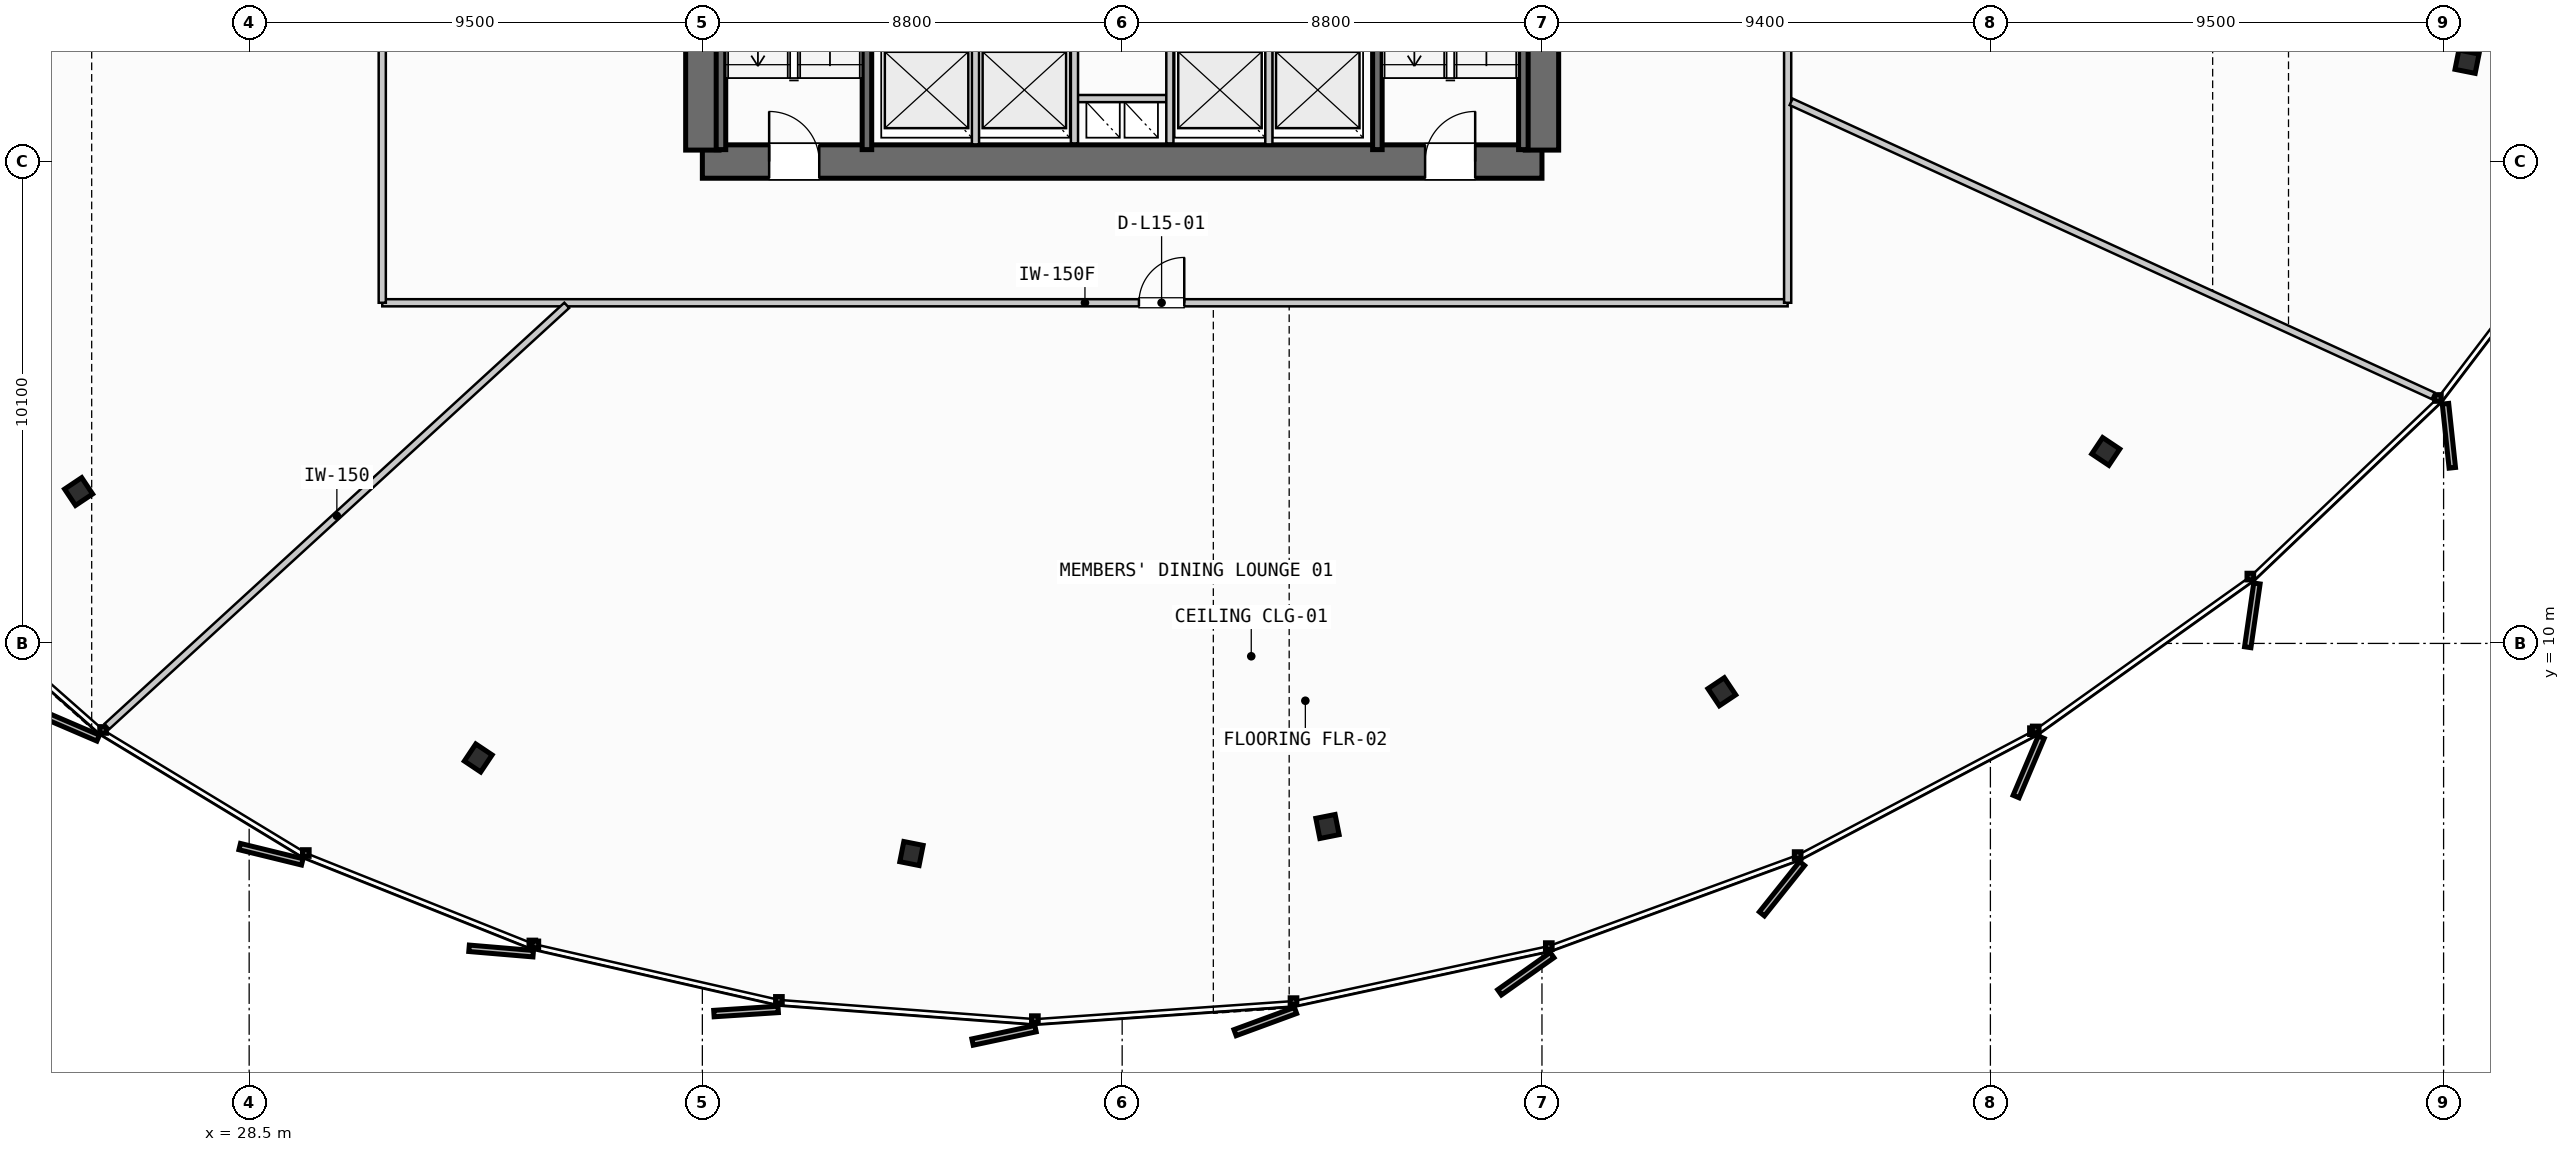
"""IFC4 building model, lengths in metres.
Left out: names, types, materials, properties, quantities, classifications, styles, units other than length and angle.
Written with IfcOpenShell. Run it as: python <this file> out.ifc"""

import sys

from ifc_helpers import new_model, si_unit, direction, frame, frame_2d, origin, origin_2d, place, context, subcontext, project, spatial, rectangle, i_section, extrude, source, transform, mapped, element, fill, save


model = new_model("IFC4")
c1 = context("Model", 3, precision=1e-05, world=origin(), true_north=direction((0.0, 1.0)))
c2 = subcontext(c1, "Body", "Model", "MODEL_VIEW")
j1 = project(units=[si_unit("LENGTHUNIT", "METRE"), si_unit("PLANEANGLEUNIT", "RADIAN")], contexts=[c1])
p1 = place(None, origin())
s1 = spatial("IfcSite", under=j1, at=p1, CompositionType="ELEMENT")
p2 = place(p1, origin())
s2 = spatial("IfcBuilding", under=s1, at=p2, CompositionType="ELEMENT")
p3 = place(p2, frame((0.0, 0.0, 63.8)))
s3 = spatial("IfcBuildingStorey", under=s2, at=p3, CompositionType="ELEMENT", Elevation=63.8)
p4 = place(p3, frame((38.0, 20.1, 0.0), z_axis=(0.0, 0.0, 1.0), x_axis=(1.0, 0.0, 0.0)))
e1 = element("IfcWall", 1, at=p4, inside=s3, PredefinedType="SHEAR", context=c2, shape_type="SweptSolid", body=[
    extrude(rectangle(XDim=17.6, YDim=0.7, at=frame_2d((8.8, 0.0))), origin(), (0.0, 0.0, 1.0), 3.55),
])
p5 = place(p4, frame((1.4, 0.0, 0.0)))
e2 = element("IfcOpeningElement", 2, at=p5, cuts=e1, PredefinedType="OPENING", context=c2, shape_type="SweptSolid", body=[
    extrude(rectangle(XDim=1.05, YDim=2.15, at=frame_2d((0.525, 1.075))), frame((0.0, 0.36, 0.0), z_axis=(0.0, -1.0, 0.0), x_axis=(1.0, 0.0, 0.0)), (0.0, 0.0, 1.0), 0.72),
])
p6 = place(p4, frame((15.15, 0.0, 0.0)))
e3 = element("IfcOpeningElement", 3, at=p6, cuts=e1, PredefinedType="OPENING", context=c2, shape_type="SweptSolid", body=[
    extrude(rectangle(XDim=1.05, YDim=2.15, at=frame_2d((0.525, 1.075))), frame((0.0, 0.36, 0.0), z_axis=(0.0, -1.0, 0.0), x_axis=(1.0, 0.0, 0.0)), (0.0, 0.0, 1.0), 0.72),
])
p7 = place(p3, frame((38.0, 35.26, 0.0), z_axis=(0.0, 0.0, 1.0), x_axis=(0.0, -1.0, 0.0)))
e4 = element("IfcWall", 4, at=p7, inside=s3, PredefinedType="SHEAR", context=c2, shape_type="SweptSolid", body=[
    extrude(rectangle(XDim=14.92, YDim=0.7, at=frame_2d((7.46, 0.0))), origin(), (0.0, 0.0, 1.0), 3.55),
])
p8 = place(p7, frame((5.21, 0.0, 0.0)))
e5 = element("IfcOpeningElement", 5, at=p8, cuts=e4, PredefinedType="OPENING", context=c2, shape_type="SweptSolid", body=[
    extrude(rectangle(XDim=1.1, YDim=2.2, at=frame_2d((0.55, 1.1))), frame((0.0, 0.36, 0.0), z_axis=(0.0, -1.0, 0.0), x_axis=(1.0, 0.0, 0.0)), (0.0, 0.0, 1.0), 0.72),
])
p9 = place(p3, frame((55.6, 20.34, 0.0), z_axis=(0.0, 0.0, 1.0), x_axis=(0.0, 1.0, 0.0)))
e6 = element("IfcWall", 6, at=p9, inside=s3, PredefinedType="SHEAR", context=c2, shape_type="SweptSolid", body=[
    extrude(rectangle(XDim=14.92, YDim=0.7, at=frame_2d((7.46, 0.0))), origin(), (0.0, 0.0, 1.0), 3.55),
])
p10 = place(p9, frame((12.71, 0.0, 0.0)))
e7 = element("IfcOpeningElement", 7, at=p10, cuts=e6, PredefinedType="OPENING", context=c2, shape_type="SweptSolid", body=[
    extrude(rectangle(XDim=1.05, YDim=2.15, at=frame_2d((0.525, 1.075))), frame((0.0, 0.36, 0.0), z_axis=(0.0, -1.0, 0.0), x_axis=(1.0, 0.0, 0.0)), (0.0, 0.0, 1.0), 0.72),
])
p11 = place(p9, frame((8.61, 0.0, 0.0)))
e8 = element("IfcOpeningElement", 8, at=p11, cuts=e6, PredefinedType="OPENING", context=c2, shape_type="SweptSolid", body=[
    extrude(rectangle(XDim=1.1, YDim=2.2, at=frame_2d((0.55, 1.1))), frame((0.0, 0.36, 0.0), z_axis=(0.0, -1.0, 0.0), x_axis=(1.0, 0.0, 0.0)), (0.0, 0.0, 1.0), 0.72),
])
m1 = source(origin(), c2, "Body", "SweptSolid", [
    extrude(i_section(OverallWidth=0.412, OverallDepth=0.431, WebThickness=0.042, FlangeThickness=0.068, FilletRadius=0.015, at=origin_2d()), origin(), (0.0, 0.0, 1.0), 3.55),
])
for number, where, z_axis, x_axis in (
    (9, (24.925, 13.183, 0.0), (0.0, 0.0, 1.0), (-0.831, -0.556, 0.0)),
    (10, (33.302, 7.599, 0.0), (0.0, 0.0, 1.0), (-0.556, -0.831, 0.0)),
    (11, (42.383, 5.596, 0.0), (0.0, 0.0, 1.0), (-0.195, -0.981, 0.0)),
    (12, (51.104, 6.163, 0.0), (0.0, 0.0, 1.0), (0.195, -0.981, 0.0)),
    (13, (59.37, 8.987, 0.0), (0.0, 0.0, 1.0), (0.556, -0.831, 0.0)),
    (14, (67.418, 14.023, 0.0), (0.0, 0.0, 1.0), (0.831, -0.556, 0.0)),
    (15, (74.991, 22.192, 0.0), (0.0, 0.0, 1.0), (0.981, -0.195, 0.0)),
):
    element("IfcColumn", number, at=place(p3, frame(where, z_axis=z_axis, x_axis=x_axis)), inside=s3, PredefinedType="COLUMN", context=c2, shape_type="MappedRepresentation", body=[
        mapped(m1, transform((0.0, 0.0, 0.0), scale=1.0)),
    ])
for number, where, z_axis, x_axis in (
    (16, (41.45, 27.7, 0.0), (0.0, 0.0, 1.0), (0.0, -1.0, 0.0)),
    (17, (38.39, 20.35, 0.0), (0.0, 0.0, 1.0), (0.0, 1.0, 0.0)),
    (18, (55.21, 27.7, 0.0), (0.0, 0.0, 1.0), (0.0, -1.0, 0.0)),
    (19, (52.15, 20.35, 0.0), (0.0, 0.0, 1.0), (0.0, 1.0, 0.0)),
):
    element("IfcWall", number, at=place(p3, frame(where, z_axis=z_axis, x_axis=x_axis)), inside=s3, PredefinedType="SHEAR", context=c2, shape_type="SweptSolid", body=[
        extrude(rectangle(XDim=7.35, YDim=0.2, at=frame_2d((3.675, 0.0))), origin(), (0.0, 0.0, 1.0), 3.55),
    ])
p12 = place(p3, frame((45.8, 21.42, 0.0), z_axis=(0.0, 0.0, 1.0), x_axis=(1.0, 0.0, 0.0)))
e20 = element("IfcWall", 20, at=p12, inside=s3, PredefinedType="PARTITIONING", context=c2, shape_type="SweptSolid", body=[
    extrude(rectangle(XDim=2.0, YDim=0.15, at=frame_2d((1.0, 0.0))), origin(), (0.0, 0.0, 1.0), 2.505),
])
for number, where, z_axis, x_axis in (
    (21, (45.8, 20.48, 0.0), (0.0, 0.0, 1.0), (0.0, 1.0, 0.0)),
    (22, (47.8, 20.48, 0.0), (0.0, 0.0, 1.0), (0.0, 1.0, 0.0)),
):
    element("IfcWall", number, at=place(p3, frame(where, z_axis=z_axis, x_axis=x_axis)), inside=s3, PredefinedType="PARTITIONING", context=c2, shape_type="SweptSolid", body=[
        extrude(rectangle(XDim=2.24, YDim=0.15, at=frame_2d((1.12, 0.0))), origin(), (0.0, 0.0, 1.0), 2.505),
    ])
for number, where, z_axis, x_axis in (
    (23, (43.725, 20.46, 0.0), (0.0, 0.0, 1.0), (0.0, 1.0, 0.0)),
    (24, (49.875, 20.46, 0.0), (0.0, 0.0, 1.0), (0.0, 1.0, 0.0)),
):
    element("IfcWall", number, at=place(p3, frame(where, z_axis=z_axis, x_axis=x_axis)), inside=s3, PredefinedType="PARTITIONING", context=c2, shape_type="SweptSolid", body=[
        extrude(rectangle(XDim=2.27, YDim=0.15, at=frame_2d((1.135, 0.0))), origin(), (0.0, 0.0, 1.0), 2.505),
    ])
p13 = place(p3, frame((31.29, 17.14, 0.0), z_axis=(0.0, 0.0, 1.0), x_axis=(1.0, 0.0, 0.0)))
e25 = element("IfcWall", 25, at=p13, inside=s3, PredefinedType="PARTITIONING", context=c2, shape_type="SweptSolid", body=[
    extrude(rectangle(XDim=29.46, YDim=0.15, at=frame_2d((14.73, 0.0))), origin(), (0.0, 0.0, 1.0), 2.505),
])
p14 = place(p13, frame((15.862, 0.0, 0.0)))
e26 = element("IfcOpeningElement", 26, at=p14, cuts=e25, PredefinedType="OPENING", context=c2, shape_type="SweptSolid", body=[
    extrude(rectangle(XDim=0.95, YDim=2.15, at=frame_2d((0.475, 1.075))), frame((0.0, 0.085, 0.0), z_axis=(0.0, -1.0, 0.0), x_axis=(1.0, 0.0, 0.0)), (0.0, 0.0, 1.0), 0.17),
])
p15 = place(p3, frame((60.75, 17.14, 0.0), z_axis=(0.0, 0.0, 1.0), x_axis=(0.0, 1.0, 0.0)))
e27 = element("IfcWall", 27, at=p15, inside=s3, PredefinedType="PARTITIONING", context=c2, shape_type="SweptSolid", body=[
    extrude(rectangle(XDim=21.32, YDim=0.15, at=frame_2d((10.66, 0.0))), origin(), (0.0, 0.0, 1.0), 2.505),
])
p16 = place(p15, frame((12.003, 0.0, 0.0)))
e28 = element("IfcOpeningElement", 28, at=p16, cuts=e27, PredefinedType="OPENING", context=c2, shape_type="SweptSolid", body=[
    extrude(rectangle(XDim=0.95, YDim=2.15, at=frame_2d((0.475, 1.075))), frame((0.0, 0.085, 0.0), z_axis=(0.0, -1.0, 0.0), x_axis=(1.0, 0.0, 0.0)), (0.0, 0.0, 1.0), 0.17),
])
p17 = place(p3, frame((31.29, 38.46, 0.0), z_axis=(0.0, 0.0, 1.0), x_axis=(0.0, -1.0, 0.0)))
e29 = element("IfcWall", 29, at=p17, inside=s3, PredefinedType="PARTITIONING", context=c2, shape_type="SweptSolid", body=[
    extrude(rectangle(XDim=21.32, YDim=0.15, at=frame_2d((10.66, 0.0))), origin(), (0.0, 0.0, 1.0), 2.505),
])
p18 = place(p17, frame((10.185, 0.0, 0.0)))
e30 = element("IfcOpeningElement", 30, at=p18, cuts=e29, PredefinedType="OPENING", context=c2, shape_type="SweptSolid", body=[
    extrude(rectangle(XDim=0.95, YDim=2.15, at=frame_2d((0.475, 1.075))), frame((0.0, 0.085, 0.0), z_axis=(0.0, -1.0, 0.0), x_axis=(1.0, 0.0, 0.0)), (0.0, 0.0, 1.0), 0.17),
])
p19 = place(p3, frame((35.158, 17.086, 0.0), z_axis=(0.0, 0.0, 1.0), x_axis=(-0.737527023473, -0.675317621306, 0.0)))
e31 = element("IfcWall", 31, at=p19, inside=s3, PredefinedType="PARTITIONING", context=c2, shape_type="SweptSolid", body=[
    extrude(rectangle(XDim=13.069, YDim=0.15, at=frame_2d((6.534, 0.0))), origin(), (0.0, 0.0, 1.0), 2.505),
])
p20 = place(p3, frame((60.823, 21.351, 0.0), z_axis=(0.0, 0.0, 1.0), x_axis=(0.909244099152, -0.416263339916, 0.0)))
e32 = element("IfcWall", 32, at=p20, inside=s3, PredefinedType="PARTITIONING", context=c2, shape_type="SweptSolid", body=[
    extrude(rectangle(XDim=14.801, YDim=0.15, at=frame_2d((7.4, 0.0))), origin(), (0.0, 0.0, 1.0), 2.505),
])
m2 = source(origin(), c2, "Body", "SweptSolid", [
    extrude(rectangle(XDim=1.05, YDim=2.15, at=frame_2d((0.525, 1.075))), frame((0.0, 0.025, 0.0), z_axis=(0.0, -1.0, 0.0), x_axis=(1.0, 0.0, 0.0)), (0.0, 0.0, 1.0), 0.05),
])
p21 = place(p5, origin())
e33 = element("IfcDoor", 33, at=p21, inside=s3, OperationType="SINGLE_SWING_LEFT", PredefinedType="DOOR", context=c2, shape_type="MappedRepresentation", body=[
    mapped(m2, transform((0.0, 0.0, 0.0), scale=1.0)),
])
fill(e2, e33)
p22 = place(p6, origin())
e34 = element("IfcDoor", 34, at=p22, inside=s3, OperationType="SINGLE_SWING_RIGHT", PredefinedType="DOOR", context=c2, shape_type="MappedRepresentation", body=[
    mapped(m2, transform((0.0, 0.0, 0.0), scale=1.0)),
])
fill(e3, e34)
m3 = source(origin(), c2, "Body", "SweptSolid", [
    extrude(rectangle(XDim=0.95, YDim=2.15, at=frame_2d((0.475, 1.075))), frame((0.0, 0.025, 0.0), z_axis=(0.0, -1.0, 0.0), x_axis=(1.0, 0.0, 0.0)), (0.0, 0.0, 1.0), 0.05),
])
p23 = place(p14, origin())
e35 = element("IfcDoor", 35, at=p23, inside=s3, OperationType="SINGLE_SWING_RIGHT", PredefinedType="DOOR", context=c2, shape_type="MappedRepresentation", body=[
    mapped(m3, transform((0.0, 0.0, 0.0), scale=1.0)),
])
fill(e26, e35)
save(model, sys.argv[1])
